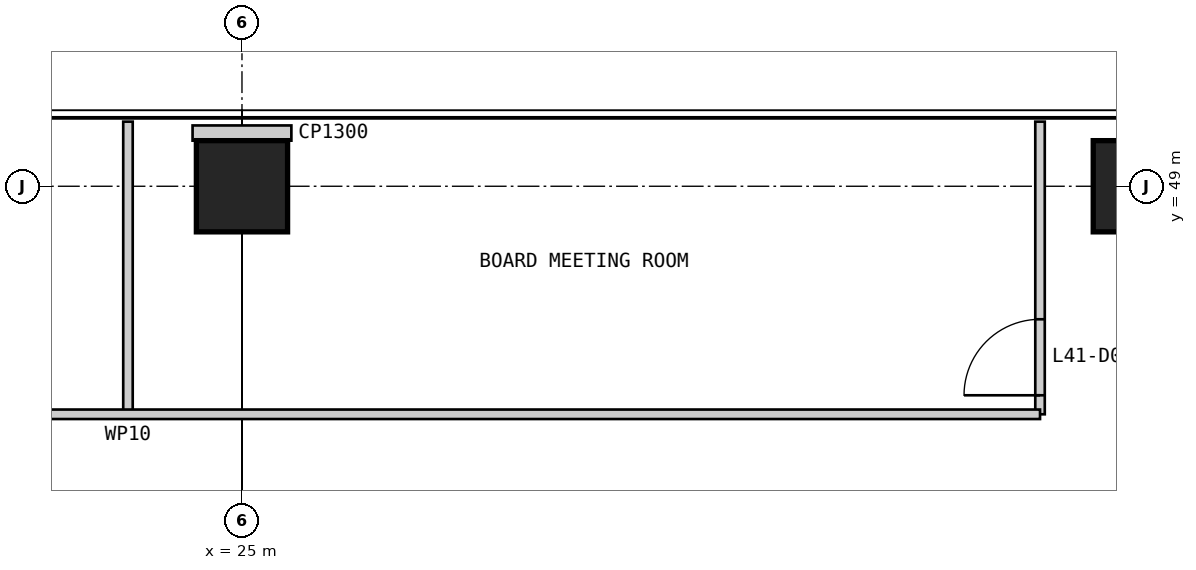
"""IFC4 building model, lengths in metres.
Left out: names, types, materials, properties, quantities, classifications, styles, units other than length and angle.
Written with IfcOpenShell. Run it as: python <this file> out.ifc"""

import sys

from ifc_helpers import new_model, si_unit, direction, frame, frame_2d, origin, origin_2d, place, context, subcontext, project, spatial, rectangle, extrude, element, fill, save


model = new_model("IFC4")
c1 = context("Model", 3, precision=1e-05, world=origin(), true_north=direction((0.0, 1.0)))
c2 = subcontext(c1, "Body", "Model", "MODEL_VIEW")
j1 = project(units=[si_unit("LENGTHUNIT", "METRE"), si_unit("PLANEANGLEUNIT", "RADIAN")], contexts=[c1])
p1 = place(None, origin())
s1 = spatial("IfcSite", under=j1, at=p1, CompositionType="ELEMENT")
p2 = place(p1, origin())
s2 = spatial("IfcBuilding", under=s1, at=p2, CompositionType="ELEMENT")
p3 = place(p2, frame((0.0, 0.0, 177.8)))
s3 = spatial("IfcBuildingStorey", under=s2, at=p3, CompositionType="ELEMENT", Elevation=177.8)
p4 = place(p3, frame((37.0, 49.0, 0.0), z_axis=(0.0, 0.0, 1.0), x_axis=(1.0, 0.0, 0.0)))
e1 = element("IfcColumn", 1, at=p4, inside=s3, PredefinedType="COLUMN", context=c2, shape_type="SweptSolid", body=[
    extrude(rectangle(XDim=1.6, YDim=1.2, at=origin_2d()), origin(), (0.0, 0.0, 1.0), 4.0),
])
p5 = place(p3, frame((25.0, 49.0, 0.0), z_axis=(0.0, 0.0, 1.0), x_axis=(1.0, 0.0, 0.0)))
e2 = element("IfcColumn", 2, at=p5, inside=s3, PredefinedType="COLUMN", context=c2, shape_type="SweptSolid", body=[
    extrude(rectangle(XDim=1.2, YDim=1.2, at=origin_2d()), origin(), (0.0, 0.0, 1.0), 4.0),
])
p6 = place(p3, frame((35.5, 49.85, 0.0), z_axis=(0.0, 0.0, 1.0), x_axis=(0.0, -1.0, 0.0)))
e3 = element("IfcWall", 3, at=p6, inside=s3, PredefinedType="PARTITIONING", context=c2, shape_type="SweptSolid", body=[
    extrude(rectangle(XDim=3.85, YDim=0.125, at=frame_2d((1.925, 0.0))), origin(), (0.0, 0.0, 1.0), 3.85),
])
p7 = place(p6, frame((2.6, 0.0, 0.0)))
e4 = element("IfcOpeningElement", 4, at=p7, cuts=e3, PredefinedType="OPENING", context=c2, shape_type="SweptSolid", body=[
    extrude(rectangle(XDim=1.0, YDim=2.2, at=frame_2d((0.5, 1.1))), frame((0.0, 0.073, 0.0), z_axis=(0.0, -1.0, 0.0), x_axis=(1.0, 0.0, 0.0)), (0.0, 0.0, 1.0), 0.145),
])
p8 = place(p3, frame((23.5, 49.85, 0.0), z_axis=(0.0, 0.0, 1.0), x_axis=(0.0, -1.0, 0.0)))
e5 = element("IfcWall", 5, at=p8, inside=s3, PredefinedType="PARTITIONING", context=c2, shape_type="SweptSolid", body=[
    extrude(rectangle(XDim=3.85, YDim=0.125, at=frame_2d((1.925, 0.0))), origin(), (0.0, 0.0, 1.0), 3.85),
])
p9 = place(p3, frame((35.5, 46.0, 0.0), z_axis=(0.0, 0.0, 1.0), x_axis=(-1.0, 0.0, 0.0)))
e6 = element("IfcWall", 6, at=p9, inside=s3, PredefinedType="PARTITIONING", context=c2, shape_type="SweptSolid", body=[
    extrude(rectangle(XDim=24.0, YDim=0.125, at=frame_2d((12.0, 0.0))), origin(), (0.0, 0.0, 1.0), 3.85),
])
p10 = place(p9, frame((16.05, 0.0, 0.0)))
e7 = element("IfcOpeningElement", 7, at=p10, cuts=e6, PredefinedType="OPENING", context=c2, shape_type="SweptSolid", body=[
    extrude(rectangle(XDim=0.9, YDim=2.2, at=frame_2d((0.45, 1.1))), frame((0.0, 0.073, 0.0), z_axis=(0.0, -1.0, 0.0), x_axis=(1.0, 0.0, 0.0)), (0.0, 0.0, 1.0), 0.145),
])
p11 = place(p9, frame((19.05, 0.0, 0.0)))
e8 = element("IfcOpeningElement", 8, at=p11, cuts=e6, PredefinedType="OPENING", context=c2, shape_type="SweptSolid", body=[
    extrude(rectangle(XDim=0.9, YDim=2.2, at=frame_2d((0.45, 1.1))), frame((0.0, 0.073, 0.0), z_axis=(0.0, -1.0, 0.0), x_axis=(1.0, 0.0, 0.0)), (0.0, 0.0, 1.0), 0.145),
])
p12 = place(p3, frame((25.0, 49.8, 0.0), z_axis=(0.0, 0.0, 1.0), x_axis=(0.0, -1.0, 0.0)))
e9 = element("IfcWall", 9, at=p12, inside=s3, PredefinedType="PARTITIONING", context=c2, shape_type="SweptSolid", body=[
    extrude(rectangle(XDim=0.2, YDim=1.3, at=frame_2d((0.1, 0.0))), origin(), (0.0, 0.0, 1.0), 3.85),
])
p13 = place(p7, frame((1.0, 0.0, 0.0), z_axis=(0.0, 0.0, 1.0), x_axis=(-1.0, 0.0, 0.0)))
e10 = element("IfcDoor", 10, at=p13, inside=s3, OperationType="SINGLE_SWING_LEFT", PredefinedType="DOOR", context=c2, shape_type="SweptSolid", body=[
    extrude(rectangle(XDim=1.0, YDim=2.2, at=frame_2d((0.5, 1.1))), frame((0.0, 0.025, 0.0), z_axis=(0.0, -1.0, 0.0), x_axis=(1.0, 0.0, 0.0)), (0.0, 0.0, 1.0), 0.05),
])
fill(e4, e10)
save(model, sys.argv[1])
